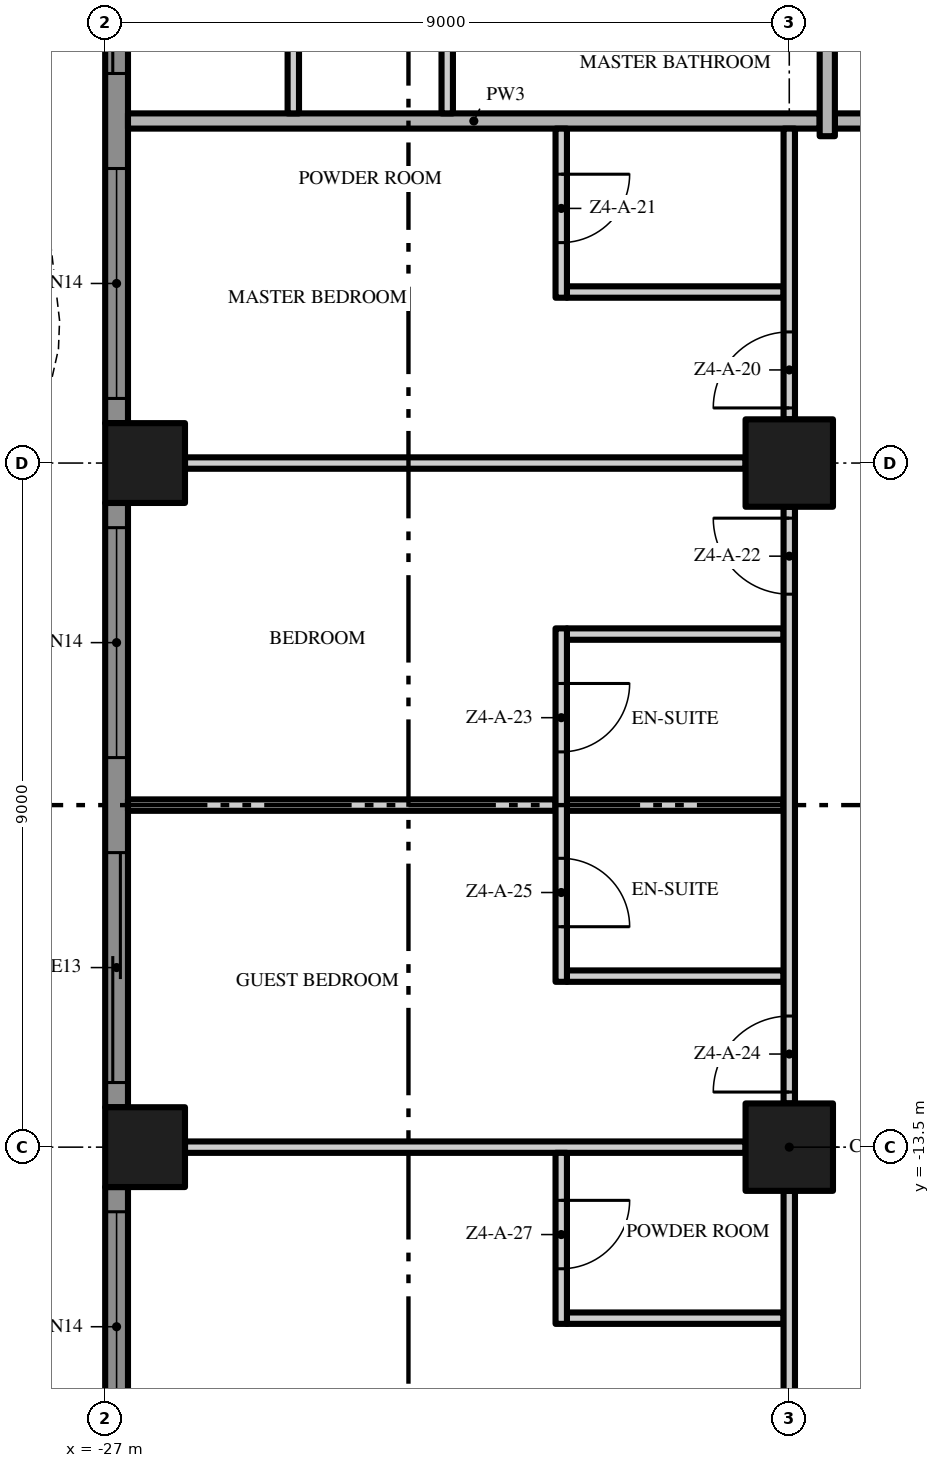
"""IFC4 building model, lengths in metres.
Left out: names, types, materials, properties, quantities, classifications, styles, units other than length and angle.
Written with IfcOpenShell. Run it as: python <this file> out.ifc"""

import sys

from ifc_helpers import new_model, si_unit, direction, frame, frame_2d, origin, origin_2d, place, context, subcontext, project, spatial, polyline, rectangle, outline, extrude, element, fill, save


model = new_model("IFC4")
c1 = context("Model", 3, precision=1e-05, world=origin(), true_north=direction((0.0, 1.0)))
c2 = subcontext(c1, "Body", "Model", "MODEL_VIEW")
j1 = project(units=[si_unit("LENGTHUNIT", "METRE"), si_unit("PLANEANGLEUNIT", "RADIAN")], contexts=[c1])
p1 = place(None, origin())
s1 = spatial("IfcSite", under=j1, at=p1, CompositionType="ELEMENT")
p2 = place(p1, origin())
s2 = spatial("IfcBuilding", under=s1, at=p2, CompositionType="ELEMENT")
p3 = place(p2, frame((0.0, 0.0, 192.0)))
s3 = spatial("IfcBuildingStorey", under=s2, at=p3, CompositionType="ELEMENT", Elevation=192.0)
for number, where, z_axis, x_axis in (
    (1, (-18.0, -13.5, 0.0), (0.0, 0.0, 1.0), (1.0, 0.0, 0.0)),
    (2, (-18.0, -4.5, 0.0), (0.0, 0.0, 1.0), (1.0, 0.0, 0.0)),
):
    element("IfcColumn", number, at=place(p3, frame(where, z_axis=z_axis, x_axis=x_axis)), inside=s3, PredefinedType="COLUMN", context=c2, shape_type="SweptSolid", body=[
        extrude(rectangle(XDim=1.15, YDim=1.15, at=origin_2d()), origin(), (0.0, 0.0, 1.0), 3.5),
    ])
for number, where, z_axis, x_axis in (
    (3, (-26.475, -13.5, 0.0), (0.0, 0.0, 1.0), (1.0, 0.0, 0.0)),
    (4, (-26.475, -4.5, 0.0), (0.0, 0.0, 1.0), (1.0, 0.0, 0.0)),
):
    element("IfcColumn", number, at=place(p3, frame(where, z_axis=z_axis, x_axis=x_axis)), inside=s3, PredefinedType="COLUMN", context=c2, shape_type="SweptSolid", body=[
        extrude(rectangle(XDim=1.05, YDim=1.05, at=origin_2d()), origin(), (0.0, 0.0, 1.0), 3.5),
    ])
p4 = place(p3, frame((-26.85, -3.975, 0.0), z_axis=(0.0, 0.0, 1.0), x_axis=(0.0, 1.0, 0.0)))
e5 = element("IfcWall", 5, at=p4, inside=s3, PredefinedType="SOLIDWALL", context=c2, shape_type="SweptSolid", body=[
    extrude(rectangle(XDim=7.95, YDim=0.3, at=frame_2d((3.975, 0.0))), origin(), (0.0, 0.0, 1.0), 3.5),
])
p5 = place(p4, frame((4.6, 0.0, 0.0)))
e6 = element("IfcOpeningElement", 6, at=p5, cuts=e5, PredefinedType="OPENING", context=c2, shape_type="SweptSolid", body=[
    extrude(rectangle(XDim=3.025, YDim=2.4, at=frame_2d((1.512, 1.2))), frame((0.0, 0.16, 0.0), z_axis=(0.0, -1.0, 0.0), x_axis=(1.0, 0.0, 0.0)), (0.0, 0.0, 1.0), 0.32),
])
p6 = place(p4, frame((0.325, 0.0, 0.45)))
e7 = element("IfcOpeningElement", 7, at=p6, cuts=e5, PredefinedType="OPENING", context=c2, shape_type="SweptSolid", body=[
    extrude(rectangle(XDim=3.025, YDim=2.65, at=frame_2d((1.512, 1.325))), frame((0.0, 0.16, 0.0), z_axis=(0.0, -1.0, 0.0), x_axis=(1.0, 0.0, 0.0)), (0.0, 0.0, 1.0), 0.32),
])
p7 = place(p3, frame((-26.85, -12.975, 0.0), z_axis=(0.0, 0.0, 1.0), x_axis=(0.0, 1.0, 0.0)))
e8 = element("IfcWall", 8, at=p7, inside=s3, PredefinedType="SOLIDWALL", context=c2, shape_type="SweptSolid", body=[
    extrude(rectangle(XDim=7.95, YDim=0.3, at=frame_2d((3.975, 0.0))), origin(), (0.0, 0.0, 1.0), 3.5),
])
p8 = place(p7, frame((4.6, 0.0, 0.45)))
e9 = element("IfcOpeningElement", 9, at=p8, cuts=e8, PredefinedType="OPENING", context=c2, shape_type="SweptSolid", body=[
    extrude(rectangle(XDim=3.025, YDim=2.65, at=frame_2d((1.512, 1.325))), frame((0.0, 0.16, 0.0), z_axis=(0.0, -1.0, 0.0), x_axis=(1.0, 0.0, 0.0)), (0.0, 0.0, 1.0), 0.32),
])
p9 = place(p7, frame((0.325, 0.0, 0.0)))
e10 = element("IfcOpeningElement", 10, at=p9, cuts=e8, PredefinedType="OPENING", context=c2, shape_type="SweptSolid", body=[
    extrude(rectangle(XDim=3.025, YDim=2.4, at=frame_2d((1.512, 1.2))), frame((0.0, 0.16, 0.0), z_axis=(0.0, -1.0, 0.0), x_axis=(1.0, 0.0, 0.0)), (0.0, 0.0, 1.0), 0.32),
])
p10 = place(p3, frame((-26.85, -18.0, 0.0), z_axis=(0.0, 0.0, 1.0), x_axis=(0.0, 1.0, 0.0)))
e11 = element("IfcWall", 11, at=p10, inside=s3, PredefinedType="SOLIDWALL", context=c2, shape_type="SweptSolid", body=[
    extrude(rectangle(XDim=3.975, YDim=0.3, at=frame_2d((1.988, 0.0))), origin(), (0.0, 0.0, 1.0), 3.5),
])
p11 = place(p10, frame((0.625, 0.0, 0.45)))
e12 = element("IfcOpeningElement", 12, at=p11, cuts=e11, PredefinedType="OPENING", context=c2, shape_type="SweptSolid", body=[
    extrude(rectangle(XDim=3.025, YDim=2.65, at=frame_2d((1.512, 1.325))), frame((0.0, 0.16, 0.0), z_axis=(0.0, -1.0, 0.0), x_axis=(1.0, 0.0, 0.0)), (0.0, 0.0, 1.0), 0.32),
])
p12 = place(p3, origin())
e13 = element("IfcWall", 13, at=p12, inside=s3, PredefinedType="USERDEFINED", context=c2, shape_type="SweptSolid", body=[
    extrude(outline(polyline([(-29.649, 18.0), (-28.988, 16.5), (-28.255, 15.0), (-27.731, 13.5), (-27.6, 12.375), (-27.615, 12.0), (-27.951, 10.5), (-28.612, 9.0), (-29.345, 7.5), (-29.869, 6.0), (-30.0, 4.875), (-29.985, 4.5), (-29.649, 3.0), (-28.988, 1.5), (-28.255, 0.0), (-27.731, -1.5), (-27.6, -2.625), (-27.615, -3.0), (-27.951, -4.5), (-28.612, -6.0), (-29.345, -7.5), (-29.869, -9.0), (-30.0, -10.125), (-29.985, -10.5), (-29.649, -12.0), (-28.988, -13.5), (-28.255, -15.0), (-27.731, -16.5), (-27.6, -17.625), (-27.615, -18.0), (-27.365, -18.01), (-27.349, -17.615), (-27.486, -16.444), (-28.024, -14.904), (-28.761, -13.395), (-29.41, -11.921), (-29.736, -10.467), (-29.749, -10.135), (-29.624, -9.056), (-29.114, -7.596), (-28.385, -6.105), (-27.713, -4.579), (-27.366, -3.033), (-27.349, -2.615), (-27.486, -1.444), (-28.024, 0.096), (-28.761, 1.605), (-29.41, 3.079), (-29.736, 4.533), (-29.749, 4.865), (-29.624, 5.944), (-29.114, 7.404), (-28.385, 8.895), (-27.713, 10.421), (-27.366, 11.967), (-27.349, 12.385), (-27.486, 13.556), (-28.024, 15.096), (-28.761, 16.605), (-29.42, 18.101), (-29.649, 18.0)])), origin(), (0.0, 0.0, 1.0), 0.9),
])
p13 = place(p3, frame((-20.925, -15.75, 0.0), z_axis=(0.0, 0.0, 1.0), x_axis=(1.0, 0.0, 0.0)))
e14 = element("IfcWall", 14, at=p13, inside=s3, PredefinedType="PARTITIONING", context=c2, shape_type="SweptSolid", body=[
    extrude(rectangle(XDim=2.85, YDim=0.15, at=frame_2d((1.425, 0.0))), origin(), (0.0, 0.0, 1.0), 3.5),
])
p14 = place(p3, frame((-25.95, -13.5, 0.0), z_axis=(0.0, 0.0, 1.0), x_axis=(1.0, 0.0, 0.0)))
e15 = element("IfcWall", 15, at=p14, inside=s3, PredefinedType="PARTITIONING", context=c2, shape_type="SweptSolid", body=[
    extrude(rectangle(XDim=7.375, YDim=0.15, at=frame_2d((3.688, 0.0))), origin(), (0.0, 0.0, 1.0), 3.5),
])
p15 = place(p3, frame((-20.925, -11.25, 0.0), z_axis=(0.0, 0.0, 1.0), x_axis=(1.0, 0.0, 0.0)))
e16 = element("IfcWall", 16, at=p15, inside=s3, PredefinedType="PARTITIONING", context=c2, shape_type="SweptSolid", body=[
    extrude(rectangle(XDim=2.85, YDim=0.15, at=frame_2d((1.425, 0.0))), origin(), (0.0, 0.0, 1.0), 3.5),
])
p16 = place(p3, frame((-26.7, -9.0, 0.0), z_axis=(0.0, 0.0, 1.0), x_axis=(1.0, 0.0, 0.0)))
e17 = element("IfcWall", 17, at=p16, inside=s3, PredefinedType="PARTITIONING", context=c2, shape_type="SweptSolid", body=[
    extrude(rectangle(XDim=5.625, YDim=0.15, at=frame_2d((2.812, 0.0))), origin(), (0.0, 0.0, 1.0), 3.5),
])
for number, where, z_axis, x_axis in (
    (18, (-20.925, -9.0, 0.0), (0.0, 0.0, 1.0), (1.0, 0.0, 0.0)),
    (19, (-20.925, -6.75, 0.0), (0.0, 0.0, 1.0), (1.0, 0.0, 0.0)),
):
    element("IfcWall", number, at=place(p3, frame(where, z_axis=z_axis, x_axis=x_axis)), inside=s3, PredefinedType="PARTITIONING", context=c2, shape_type="SweptSolid", body=[
        extrude(rectangle(XDim=2.85, YDim=0.15, at=frame_2d((1.425, 0.0))), origin(), (0.0, 0.0, 1.0), 3.5),
    ])
p17 = place(p3, frame((-25.95, -4.5, 0.0), z_axis=(0.0, 0.0, 1.0), x_axis=(1.0, 0.0, 0.0)))
e20 = element("IfcWall", 20, at=p17, inside=s3, PredefinedType="PARTITIONING", context=c2, shape_type="SweptSolid", body=[
    extrude(rectangle(XDim=7.375, YDim=0.15, at=frame_2d((3.688, 0.0))), origin(), (0.0, 0.0, 1.0), 3.5),
])
p18 = place(p3, frame((-20.925, -2.25, 0.0), z_axis=(0.0, 0.0, 1.0), x_axis=(1.0, 0.0, 0.0)))
e21 = element("IfcWall", 21, at=p18, inside=s3, PredefinedType="PARTITIONING", context=c2, shape_type="SweptSolid", body=[
    extrude(rectangle(XDim=2.85, YDim=0.15, at=frame_2d((1.425, 0.0))), origin(), (0.0, 0.0, 1.0), 3.5),
])
p19 = place(p3, frame((-17.4, 0.0, 0.0), z_axis=(0.0, 0.0, 1.0), x_axis=(1.0, 0.0, 0.0)))
e22 = element("IfcWall", 22, at=p19, inside=s3, PredefinedType="PARTITIONING", context=c2, shape_type="SweptSolid", body=[
    extrude(rectangle(XDim=12.8, YDim=0.2, at=frame_2d((6.4, 0.0))), origin(), (0.0, 0.0, 1.0), 3.5),
])
p20 = place(p3, frame((-26.7, 0.0, 0.0), z_axis=(0.0, 0.0, 1.0), x_axis=(1.0, 0.0, 0.0)))
e23 = element("IfcWall", 23, at=p20, inside=s3, PredefinedType="PARTITIONING", context=c2, shape_type="SweptSolid", body=[
    extrude(rectangle(XDim=9.1, YDim=0.2, at=frame_2d((4.55, 0.0))), origin(), (0.0, 0.0, 1.0), 3.5),
])
p21 = place(p3, frame((-24.525, 0.1, 0.0), z_axis=(0.0, 0.0, 1.0), x_axis=(0.0, 1.0, 0.0)))
e24 = element("IfcWall", 24, at=p21, inside=s3, PredefinedType="PARTITIONING", context=c2, shape_type="SweptSolid", body=[
    extrude(rectangle(XDim=2.225, YDim=0.15, at=frame_2d((1.113, 0.0))), origin(), (0.0, 0.0, 1.0), 3.5),
])
p22 = place(p3, frame((-22.5, 0.1, 0.0), z_axis=(0.0, 0.0, 1.0), x_axis=(0.0, 1.0, 0.0)))
e25 = element("IfcWall", 25, at=p22, inside=s3, PredefinedType="PARTITIONING", context=c2, shape_type="SweptSolid", body=[
    extrude(rectangle(XDim=17.375, YDim=0.15, at=frame_2d((8.688, 0.0))), origin(), (0.0, 0.0, 1.0), 3.5),
])
p23 = place(p22, frame((2.4, 0.0, 0.0)))
e26 = element("IfcOpeningElement", 26, at=p23, cuts=e25, PredefinedType="OPENING", context=c2, shape_type="SweptSolid", body=[
    extrude(rectangle(XDim=1.8, YDim=2.4, at=frame_2d((0.9, 1.2))), frame((0.0, 0.085, 0.0), z_axis=(0.0, -1.0, 0.0), x_axis=(1.0, 0.0, 0.0)), (0.0, 0.0, 1.0), 0.17),
])
p24 = place(p22, frame((10.65, 0.0, 0.0)))
e27 = element("IfcOpeningElement", 27, at=p24, cuts=e25, PredefinedType="OPENING", context=c2, shape_type="SweptSolid", body=[
    extrude(rectangle(XDim=1.0, YDim=2.4, at=frame_2d((0.5, 1.2))), frame((0.0, 0.085, 0.0), z_axis=(0.0, -1.0, 0.0), x_axis=(1.0, 0.0, 0.0)), (0.0, 0.0, 1.0), 0.17),
])
p25 = place(p3, frame((-21.0, -13.575, 0.0), z_axis=(0.0, 0.0, 1.0), x_axis=(0.0, -1.0, 0.0)))
e28 = element("IfcWall", 28, at=p25, inside=s3, PredefinedType="PARTITIONING", context=c2, shape_type="SweptSolid", body=[
    extrude(rectangle(XDim=2.25, YDim=0.15, at=frame_2d((1.125, 0.0))), origin(), (0.0, 0.0, 1.0), 3.5),
])
p26 = place(p25, frame((0.625, 0.0, 0.0)))
e29 = element("IfcOpeningElement", 29, at=p26, cuts=e28, PredefinedType="OPENING", context=c2, shape_type="SweptSolid", body=[
    extrude(rectangle(XDim=0.9, YDim=2.1, at=frame_2d((0.45, 1.05))), frame((0.0, 0.085, 0.0), z_axis=(0.0, -1.0, 0.0), x_axis=(1.0, 0.0, 0.0)), (0.0, 0.0, 1.0), 0.17),
])
p27 = place(p3, frame((-21.0, -6.675, 0.0), z_axis=(0.0, 0.0, 1.0), x_axis=(0.0, -1.0, 0.0)))
e30 = element("IfcWall", 30, at=p27, inside=s3, PredefinedType="PARTITIONING", context=c2, shape_type="SweptSolid", body=[
    extrude(rectangle(XDim=4.65, YDim=0.15, at=frame_2d((2.325, 0.0))), origin(), (0.0, 0.0, 1.0), 3.5),
])
p28 = place(p27, frame((0.725, 0.0, 0.0)))
e31 = element("IfcOpeningElement", 31, at=p28, cuts=e30, PredefinedType="OPENING", context=c2, shape_type="SweptSolid", body=[
    extrude(rectangle(XDim=0.9, YDim=2.1, at=frame_2d((0.45, 1.05))), frame((0.0, 0.085, 0.0), z_axis=(0.0, -1.0, 0.0), x_axis=(1.0, 0.0, 0.0)), (0.0, 0.0, 1.0), 0.17),
])
p29 = place(p27, frame((3.025, 0.0, 0.0)))
e32 = element("IfcOpeningElement", 32, at=p29, cuts=e30, PredefinedType="OPENING", context=c2, shape_type="SweptSolid", body=[
    extrude(rectangle(XDim=0.9, YDim=2.1, at=frame_2d((0.45, 1.05))), frame((0.0, 0.085, 0.0), z_axis=(0.0, -1.0, 0.0), x_axis=(1.0, 0.0, 0.0)), (0.0, 0.0, 1.0), 0.17),
])
p30 = place(p3, frame((-21.0, -0.1, 0.0), z_axis=(0.0, 0.0, 1.0), x_axis=(0.0, -1.0, 0.0)))
e33 = element("IfcWall", 33, at=p30, inside=s3, PredefinedType="PARTITIONING", context=c2, shape_type="SweptSolid", body=[
    extrude(rectangle(XDim=2.225, YDim=0.15, at=frame_2d((1.113, 0.0))), origin(), (0.0, 0.0, 1.0), 3.5),
])
p31 = place(p30, frame((0.6, 0.0, 0.0)))
e34 = element("IfcOpeningElement", 34, at=p31, cuts=e33, PredefinedType="OPENING", context=c2, shape_type="SweptSolid", body=[
    extrude(rectangle(XDim=0.9, YDim=2.1, at=frame_2d((0.45, 1.05))), frame((0.0, 0.085, 0.0), z_axis=(0.0, -1.0, 0.0), x_axis=(1.0, 0.0, 0.0)), (0.0, 0.0, 1.0), 0.17),
])
p32 = place(p3, frame((-18.0, -21.45, 0.0), z_axis=(0.0, 0.0, 1.0), x_axis=(0.0, 1.0, 0.0)))
e35 = element("IfcWall", 35, at=p32, inside=s3, PredefinedType="PARTITIONING", context=c2, shape_type="SweptSolid", body=[
    extrude(rectangle(XDim=7.375, YDim=0.15, at=frame_2d((3.688, 0.0))), origin(), (0.0, 0.0, 1.0), 3.5),
])
p33 = place(p32, frame((1.45, 0.0, 0.0)))
e36 = element("IfcOpeningElement", 36, at=p33, cuts=e35, PredefinedType="OPENING", context=c2, shape_type="SweptSolid", body=[
    extrude(rectangle(XDim=1.8, YDim=2.4, at=frame_2d((0.9, 1.2))), frame((0.0, 0.085, 0.0), z_axis=(0.0, -1.0, 0.0), x_axis=(1.0, 0.0, 0.0)), (0.0, 0.0, 1.0), 0.17),
])
p34 = place(p3, frame((-18.0, -12.925, 0.0), z_axis=(0.0, 0.0, 1.0), x_axis=(0.0, 1.0, 0.0)))
e37 = element("IfcWall", 37, at=p34, inside=s3, PredefinedType="PARTITIONING", context=c2, shape_type="SweptSolid", body=[
    extrude(rectangle(XDim=7.85, YDim=0.15, at=frame_2d((3.925, 0.0))), origin(), (0.0, 0.0, 1.0), 3.5),
])
p35 = place(p34, frame((6.7, 0.0, 0.0)))
e38 = element("IfcOpeningElement", 38, at=p35, cuts=e37, PredefinedType="OPENING", context=c2, shape_type="SweptSolid", body=[
    extrude(rectangle(XDim=1.0, YDim=2.4, at=frame_2d((0.5, 1.2))), frame((0.0, 0.085, 0.0), z_axis=(0.0, -1.0, 0.0), x_axis=(1.0, 0.0, 0.0)), (0.0, 0.0, 1.0), 0.17),
])
p36 = place(p34, frame((0.15, 0.0, 0.0)))
e39 = element("IfcOpeningElement", 39, at=p36, cuts=e37, PredefinedType="OPENING", context=c2, shape_type="SweptSolid", body=[
    extrude(rectangle(XDim=1.0, YDim=2.4, at=frame_2d((0.5, 1.2))), frame((0.0, 0.085, 0.0), z_axis=(0.0, -1.0, 0.0), x_axis=(1.0, 0.0, 0.0)), (0.0, 0.0, 1.0), 0.17),
])
p37 = place(p3, frame((-18.0, -3.925, 0.0), z_axis=(0.0, 0.0, 1.0), x_axis=(0.0, 1.0, 0.0)))
e40 = element("IfcWall", 40, at=p37, inside=s3, PredefinedType="PARTITIONING", context=c2, shape_type="SweptSolid", body=[
    extrude(rectangle(XDim=3.825, YDim=0.15, at=frame_2d((1.913, 0.0))), origin(), (0.0, 0.0, 1.0), 3.5),
])
p38 = place(p37, frame((0.15, 0.0, 0.0)))
e41 = element("IfcOpeningElement", 41, at=p38, cuts=e40, PredefinedType="OPENING", context=c2, shape_type="SweptSolid", body=[
    extrude(rectangle(XDim=1.0, YDim=2.4, at=frame_2d((0.5, 1.2))), frame((0.0, 0.085, 0.0), z_axis=(0.0, -1.0, 0.0), x_axis=(1.0, 0.0, 0.0)), (0.0, 0.0, 1.0), 0.17),
])
p39 = place(p3, frame((-17.5, -0.2, 0.0), z_axis=(0.0, 0.0, 1.0), x_axis=(0.0, 1.0, 0.0)))
e42 = element("IfcWall", 42, at=p39, inside=s3, PredefinedType="PARTITIONING", context=c2, shape_type="SweptSolid", body=[
    extrude(rectangle(XDim=4.125, YDim=0.2, at=frame_2d((2.062, 0.0))), origin(), (0.0, 0.0, 1.0), 3.5),
])
p40 = place(p5, origin())
e43 = element("IfcDoor", 43, at=p40, inside=s3, OperationType="SINGLE_SWING_LEFT", PredefinedType="DOOR", context=c2, shape_type="SweptSolid", body=[
    extrude(rectangle(XDim=3.025, YDim=2.4, at=frame_2d((1.512, 1.2))), frame((0.0, 0.025, 0.0), z_axis=(0.0, -1.0, 0.0), x_axis=(1.0, 0.0, 0.0)), (0.0, 0.0, 1.0), 0.05),
])
fill(e6, e43)
p41 = place(p6, origin())
e44 = element("IfcWindow", 44, at=p41, inside=s3, PartitioningType="SINGLE_PANEL", PredefinedType="WINDOW", context=c2, shape_type="SweptSolid", body=[
    extrude(rectangle(XDim=3.025, YDim=2.65, at=frame_2d((1.512, 1.325))), frame((0.0, 0.03, 0.0), z_axis=(0.0, -1.0, 0.0), x_axis=(1.0, 0.0, 0.0)), (0.0, 0.0, 1.0), 0.06),
])
fill(e7, e44)
p42 = place(p8, origin())
e45 = element("IfcWindow", 45, at=p42, inside=s3, PartitioningType="SINGLE_PANEL", PredefinedType="WINDOW", context=c2, shape_type="SweptSolid", body=[
    extrude(rectangle(XDim=3.025, YDim=2.65, at=frame_2d((1.512, 1.325))), frame((0.0, 0.03, 0.0), z_axis=(0.0, -1.0, 0.0), x_axis=(1.0, 0.0, 0.0)), (0.0, 0.0, 1.0), 0.06),
])
fill(e9, e45)
p43 = place(p9, origin())
e46 = element("IfcDoor", 46, at=p43, inside=s3, OperationType="SINGLE_SWING_LEFT", PredefinedType="DOOR", context=c2, shape_type="SweptSolid", body=[
    extrude(rectangle(XDim=3.025, YDim=2.4, at=frame_2d((1.512, 1.2))), frame((0.0, 0.025, 0.0), z_axis=(0.0, -1.0, 0.0), x_axis=(1.0, 0.0, 0.0)), (0.0, 0.0, 1.0), 0.05),
])
fill(e10, e46)
p44 = place(p11, origin())
e47 = element("IfcWindow", 47, at=p44, inside=s3, PartitioningType="SINGLE_PANEL", PredefinedType="WINDOW", context=c2, shape_type="SweptSolid", body=[
    extrude(rectangle(XDim=3.025, YDim=2.65, at=frame_2d((1.512, 1.325))), frame((0.0, 0.03, 0.0), z_axis=(0.0, -1.0, 0.0), x_axis=(1.0, 0.0, 0.0)), (0.0, 0.0, 1.0), 0.06),
])
fill(e12, e47)
p45 = place(p38, origin())
e48 = element("IfcDoor", 48, at=p45, inside=s3, OperationType="SINGLE_SWING_LEFT", PredefinedType="DOOR", context=c2, shape_type="SweptSolid", body=[
    extrude(rectangle(XDim=1.0, YDim=2.4, at=frame_2d((0.5, 1.2))), frame((0.0, 0.025, 0.0), z_axis=(0.0, -1.0, 0.0), x_axis=(1.0, 0.0, 0.0)), (0.0, 0.0, 1.0), 0.05),
])
fill(e41, e48)
p46 = place(p31, origin())
e49 = element("IfcDoor", 49, at=p46, inside=s3, OperationType="SINGLE_SWING_LEFT", PredefinedType="DOOR", context=c2, shape_type="SweptSolid", body=[
    extrude(rectangle(XDim=0.9, YDim=2.1, at=frame_2d((0.45, 1.05))), frame((0.0, 0.025, 0.0), z_axis=(0.0, -1.0, 0.0), x_axis=(1.0, 0.0, 0.0)), (0.0, 0.0, 1.0), 0.05),
])
fill(e34, e49)
p47 = place(p35, origin())
e50 = element("IfcDoor", 50, at=p47, inside=s3, OperationType="SINGLE_SWING_RIGHT", PredefinedType="DOOR", context=c2, shape_type="SweptSolid", body=[
    extrude(rectangle(XDim=1.0, YDim=2.4, at=frame_2d((0.5, 1.2))), frame((0.0, 0.025, 0.0), z_axis=(0.0, -1.0, 0.0), x_axis=(1.0, 0.0, 0.0)), (0.0, 0.0, 1.0), 0.05),
])
fill(e38, e50)
p48 = place(p28, origin())
e51 = element("IfcDoor", 51, at=p48, inside=s3, OperationType="SINGLE_SWING_LEFT", PredefinedType="DOOR", context=c2, shape_type="SweptSolid", body=[
    extrude(rectangle(XDim=0.9, YDim=2.1, at=frame_2d((0.45, 1.05))), frame((0.0, 0.025, 0.0), z_axis=(0.0, -1.0, 0.0), x_axis=(1.0, 0.0, 0.0)), (0.0, 0.0, 1.0), 0.05),
])
fill(e31, e51)
p49 = place(p36, origin())
e52 = element("IfcDoor", 52, at=p49, inside=s3, OperationType="SINGLE_SWING_LEFT", PredefinedType="DOOR", context=c2, shape_type="SweptSolid", body=[
    extrude(rectangle(XDim=1.0, YDim=2.4, at=frame_2d((0.5, 1.2))), frame((0.0, 0.025, 0.0), z_axis=(0.0, -1.0, 0.0), x_axis=(1.0, 0.0, 0.0)), (0.0, 0.0, 1.0), 0.05),
])
fill(e39, e52)
p50 = place(p29, origin())
e53 = element("IfcDoor", 53, at=p50, inside=s3, OperationType="SINGLE_SWING_RIGHT", PredefinedType="DOOR", context=c2, shape_type="SweptSolid", body=[
    extrude(rectangle(XDim=0.9, YDim=2.1, at=frame_2d((0.45, 1.05))), frame((0.0, 0.025, 0.0), z_axis=(0.0, -1.0, 0.0), x_axis=(1.0, 0.0, 0.0)), (0.0, 0.0, 1.0), 0.05),
])
fill(e32, e53)
p51 = place(p26, origin())
e54 = element("IfcDoor", 54, at=p51, inside=s3, OperationType="SINGLE_SWING_LEFT", PredefinedType="DOOR", context=c2, shape_type="SweptSolid", body=[
    extrude(rectangle(XDim=0.9, YDim=2.1, at=frame_2d((0.45, 1.05))), frame((0.0, 0.025, 0.0), z_axis=(0.0, -1.0, 0.0), x_axis=(1.0, 0.0, 0.0)), (0.0, 0.0, 1.0), 0.05),
])
fill(e29, e54)
save(model, sys.argv[1])
